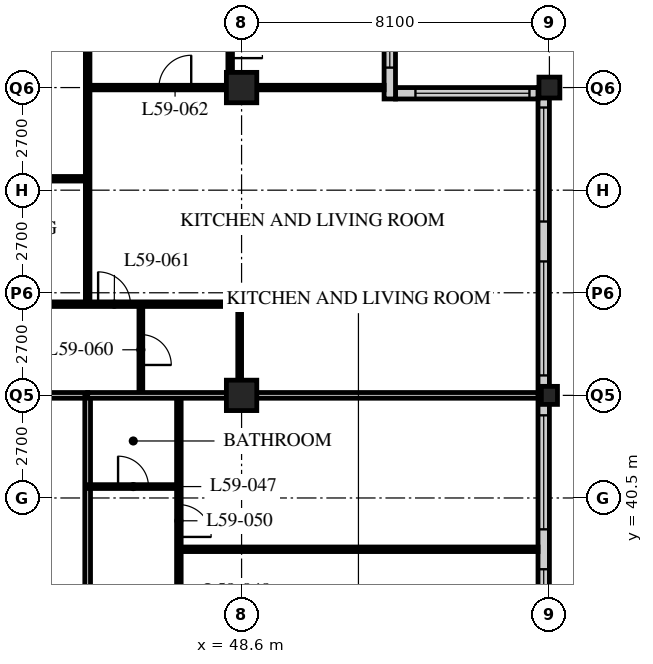
"""IFC4 building model, lengths in metres.
Left out: names, types, materials, properties, quantities, classifications, styles, units other than length and angle.
Written with IfcOpenShell. Run it as: python <this file> out.ifc"""

import sys

from ifc_helpers import new_model, si_unit, direction, frame, frame_2d, origin, origin_2d, place, context, subcontext, project, spatial, rectangle, hollow_rectangle, i_section, extrude, element, fill, save


model = new_model("IFC4")
c1 = context("Model", 3, precision=1e-05, world=origin(), true_north=direction((0.0, 1.0)))
c2 = subcontext(c1, "Body", "Model", "MODEL_VIEW")
j1 = project(units=[si_unit("LENGTHUNIT", "METRE"), si_unit("PLANEANGLEUNIT", "RADIAN")], contexts=[c1])
p1 = place(None, origin())
s1 = spatial("IfcSite", under=j1, at=p1, CompositionType="ELEMENT")
p2 = place(p1, origin())
s2 = spatial("IfcBuilding", under=s1, at=p2, CompositionType="ELEMENT")
p3 = place(p2, frame((0.0, 0.0, 228.0)))
s3 = spatial("IfcBuildingStorey", under=s2, at=p3, CompositionType="ELEMENT", Elevation=228.0)
for number, where, z_axis, x_axis in (
    (1, (48.6, 43.2, 0.0), (0.0, 0.0, 1.0), (1.0, 0.0, 0.0)),
    (2, (48.6, 51.3, 0.0), (0.0, 0.0, 1.0), (1.0, 0.0, 0.0)),
):
    element("IfcColumn", number, at=place(p3, frame(where, z_axis=z_axis, x_axis=x_axis)), inside=s3, PredefinedType="COLUMN", context=c2, shape_type="SweptSolid", body=[
        extrude(hollow_rectangle(XDim=0.8, YDim=0.8, WallThickness=0.08, at=origin_2d()), origin(), (0.0, 0.0, 1.0), 3.6),
    ])
p4 = place(p3, frame((56.7, 43.2, 0.0), z_axis=(0.0, 0.0, 1.0), x_axis=(1.0, 0.0, 0.0)))
e3 = element("IfcColumn", 3, at=p4, inside=s3, PredefinedType="COLUMN", context=c2, shape_type="SweptSolid", body=[
    extrude(i_section(OverallWidth=0.424, OverallDepth=0.475, WebThickness=0.048, FlangeThickness=0.077, FilletRadius=0.015, at=origin_2d()), origin(), (0.0, 0.0, 1.0), 3.6),
])
p5 = place(p3, frame((56.7, 51.3, 0.0), z_axis=(0.0, 0.0, 1.0), x_axis=(1.0, 0.0, 0.0)))
e4 = element("IfcColumn", 4, at=p5, inside=s3, PredefinedType="COLUMN", context=c2, shape_type="SweptSolid", body=[
    extrude(hollow_rectangle(XDim=0.55, YDim=0.55, WallThickness=0.045, at=origin_2d()), origin(), (0.0, 0.0, 1.0), 3.6),
])
p6 = place(p3, frame((56.55, 19.2, 0.0), z_axis=(0.0, 0.0, 1.0), x_axis=(0.0, 1.0, 0.0)))
e5 = element("IfcWall", 5, at=p6, inside=s3, PredefinedType="SOLIDWALL", context=c2, shape_type="SweptSolid", body=[
    extrude(rectangle(XDim=32.1, YDim=0.3, at=frame_2d((16.05, 0.0))), origin(), (0.0, 0.0, 1.0), 3.39),
])
p7 = place(p6, frame((0.225, 0.0, 0.6)))
e6 = element("IfcOpeningElement", 6, at=p7, cuts=e5, PredefinedType="OPENING", context=c2, shape_type="SweptSolid", body=[
    extrude(rectangle(XDim=3.0, YDim=2.0, at=frame_2d((1.5, 1.0))), frame((0.0, 0.16, 0.0), z_axis=(0.0, -1.0, 0.0), x_axis=(1.0, 0.0, 0.0)), (0.0, 0.0, 1.0), 0.32),
])
p8 = place(p6, frame((4.275, 0.0, 0.6)))
e7 = element("IfcOpeningElement", 7, at=p8, cuts=e5, PredefinedType="OPENING", context=c2, shape_type="SweptSolid", body=[
    extrude(rectangle(XDim=3.0, YDim=2.0, at=frame_2d((1.5, 1.0))), frame((0.0, 0.16, 0.0), z_axis=(0.0, -1.0, 0.0), x_axis=(1.0, 0.0, 0.0)), (0.0, 0.0, 1.0), 0.32),
])
p9 = place(p6, frame((8.325, 0.0, 0.6)))
e8 = element("IfcOpeningElement", 8, at=p9, cuts=e5, PredefinedType="OPENING", context=c2, shape_type="SweptSolid", body=[
    extrude(rectangle(XDim=3.0, YDim=2.0, at=frame_2d((1.5, 1.0))), frame((0.0, 0.16, 0.0), z_axis=(0.0, -1.0, 0.0), x_axis=(1.0, 0.0, 0.0)), (0.0, 0.0, 1.0), 0.32),
])
p10 = place(p6, frame((12.375, 0.0, 0.6)))
e9 = element("IfcOpeningElement", 9, at=p10, cuts=e5, PredefinedType="OPENING", context=c2, shape_type="SweptSolid", body=[
    extrude(rectangle(XDim=3.0, YDim=2.0, at=frame_2d((1.5, 1.0))), frame((0.0, 0.16, 0.0), z_axis=(0.0, -1.0, 0.0), x_axis=(1.0, 0.0, 0.0)), (0.0, 0.0, 1.0), 0.32),
])
p11 = place(p6, frame((16.425, 0.0, 0.6)))
e10 = element("IfcOpeningElement", 10, at=p11, cuts=e5, PredefinedType="OPENING", context=c2, shape_type="SweptSolid", body=[
    extrude(rectangle(XDim=3.0, YDim=2.0, at=frame_2d((1.5, 1.0))), frame((0.0, 0.16, 0.0), z_axis=(0.0, -1.0, 0.0), x_axis=(1.0, 0.0, 0.0)), (0.0, 0.0, 1.0), 0.32),
])
p12 = place(p6, frame((20.475, 0.0, 0.6)))
e11 = element("IfcOpeningElement", 11, at=p12, cuts=e5, PredefinedType="OPENING", context=c2, shape_type="SweptSolid", body=[
    extrude(rectangle(XDim=3.0, YDim=2.0, at=frame_2d((1.5, 1.0))), frame((0.0, 0.16, 0.0), z_axis=(0.0, -1.0, 0.0), x_axis=(1.0, 0.0, 0.0)), (0.0, 0.0, 1.0), 0.32),
])
p13 = place(p6, frame((24.525, 0.0, 0.6)))
e12 = element("IfcOpeningElement", 12, at=p13, cuts=e5, PredefinedType="OPENING", context=c2, shape_type="SweptSolid", body=[
    extrude(rectangle(XDim=3.0, YDim=2.0, at=frame_2d((1.5, 1.0))), frame((0.0, 0.16, 0.0), z_axis=(0.0, -1.0, 0.0), x_axis=(1.0, 0.0, 0.0)), (0.0, 0.0, 1.0), 0.32),
])
p14 = place(p6, frame((28.575, 0.0, 0.6)))
e13 = element("IfcOpeningElement", 13, at=p14, cuts=e5, PredefinedType="OPENING", context=c2, shape_type="SweptSolid", body=[
    extrude(rectangle(XDim=3.0, YDim=2.0, at=frame_2d((1.5, 1.0))), frame((0.0, 0.16, 0.0), z_axis=(0.0, -1.0, 0.0), x_axis=(1.0, 0.0, 0.0)), (0.0, 0.0, 1.0), 0.32),
])
p15 = place(p3, frame((56.4, 51.15, 0.0), z_axis=(0.0, 0.0, 1.0), x_axis=(-1.0, 0.0, 0.0)))
e14 = element("IfcWall", 14, at=p15, inside=s3, PredefinedType="SOLIDWALL", context=c2, shape_type="SweptSolid", body=[
    extrude(rectangle(XDim=3.75, YDim=0.3, at=frame_2d((1.875, 0.0))), origin(), (0.0, 0.0, 1.0), 3.39),
])
p16 = place(p15, frame((0.225, 0.0, 0.6)))
e15 = element("IfcOpeningElement", 15, at=p16, cuts=e14, PredefinedType="OPENING", context=c2, shape_type="SweptSolid", body=[
    extrude(rectangle(XDim=3.0, YDim=2.0, at=frame_2d((1.5, 1.0))), frame((0.0, 0.16, 0.0), z_axis=(0.0, -1.0, 0.0), x_axis=(1.0, 0.0, 0.0)), (0.0, 0.0, 1.0), 0.32),
])
p17 = place(p3, frame((52.5, 51.0, 0.0), z_axis=(0.0, 0.0, 1.0), x_axis=(0.0, 1.0, 0.0)))
e16 = element("IfcWall", 16, at=p17, inside=s3, PredefinedType="SOLIDWALL", context=c2, shape_type="SweptSolid", body=[
    extrude(rectangle(XDim=4.35, YDim=0.3, at=frame_2d((2.175, 0.0))), origin(), (0.0, 0.0, 1.0), 3.39),
])
p18 = place(p17, frame((0.825, 0.0, 0.6)))
e17 = element("IfcOpeningElement", 17, at=p18, cuts=e16, PredefinedType="OPENING", context=c2, shape_type="SweptSolid", body=[
    extrude(rectangle(XDim=3.0, YDim=2.0, at=frame_2d((1.5, 1.0))), frame((0.0, 0.16, 0.0), z_axis=(0.0, -1.0, 0.0), x_axis=(1.0, 0.0, 0.0)), (0.0, 0.0, 1.0), 0.32),
])
p19 = place(p3, frame((8.1, 43.2, 0.0), z_axis=(0.0, 0.0, 1.0), x_axis=(1.0, 0.0, 0.0)))
e18 = element("IfcWall", 18, at=p19, inside=s3, PredefinedType="PARTITIONING", context=c2, shape_type="SweptSolid", body=[
    extrude(rectangle(XDim=36.45, YDim=0.15, at=frame_2d((18.225, 0.0))), origin(), (0.0, 0.0, 1.0), 2.628),
])
p20 = place(p19, frame((4.45, 0.0, 0.0)))
e19 = element("IfcOpeningElement", 19, at=p20, cuts=e18, PredefinedType="OPENING", context=c2, shape_type="SweptSolid", body=[
    extrude(rectangle(XDim=1.0, YDim=2.1, at=frame_2d((0.5, 1.05))), frame((0.0, 0.085, 0.0), z_axis=(0.0, -1.0, 0.0), x_axis=(1.0, 0.0, 0.0)), (0.0, 0.0, 1.0), 0.17),
])
p21 = place(p19, frame((17.1, 0.0, 0.0)))
e20 = element("IfcOpeningElement", 20, at=p21, cuts=e18, PredefinedType="OPENING", context=c2, shape_type="SweptSolid", body=[
    extrude(rectangle(XDim=1.0, YDim=2.1, at=frame_2d((0.5, 1.05))), frame((0.0, 0.085, 0.0), z_axis=(0.0, -1.0, 0.0), x_axis=(1.0, 0.0, 0.0)), (0.0, 0.0, 1.0), 0.17),
])
p22 = place(p19, frame((29.05, 0.0, 0.0)))
e21 = element("IfcOpeningElement", 21, at=p22, cuts=e18, PredefinedType="OPENING", context=c2, shape_type="SweptSolid", body=[
    extrude(rectangle(XDim=1.0, YDim=2.1, at=frame_2d((0.5, 1.05))), frame((0.0, 0.085, 0.0), z_axis=(0.0, -1.0, 0.0), x_axis=(1.0, 0.0, 0.0)), (0.0, 0.0, 1.0), 0.17),
])
p23 = place(p19, frame((33.925, 0.0, 0.0)))
e22 = element("IfcOpeningElement", 22, at=p23, cuts=e18, PredefinedType="OPENING", context=c2, shape_type="SweptSolid", body=[
    extrude(rectangle(XDim=1.0, YDim=2.1, at=frame_2d((0.5, 1.05))), frame((0.0, 0.085, 0.0), z_axis=(0.0, -1.0, 0.0), x_axis=(1.0, 0.0, 0.0)), (0.0, 0.0, 1.0), 0.17),
])
p24 = place(p19, frame((1.525, 0.0, 0.0)))
e23 = element("IfcOpeningElement", 23, at=p24, cuts=e18, PredefinedType="OPENING", context=c2, shape_type="SweptSolid", body=[
    extrude(rectangle(XDim=1.0, YDim=2.1, at=frame_2d((0.5, 1.05))), frame((0.0, 0.085, 0.0), z_axis=(0.0, -1.0, 0.0), x_axis=(1.0, 0.0, 0.0)), (0.0, 0.0, 1.0), 0.17),
])
p25 = place(p3, frame((44.55, 18.9, 0.0), z_axis=(0.0, 0.0, 1.0), x_axis=(0.0, 1.0, 0.0)))
e24 = element("IfcWall", 24, at=p25, inside=s3, PredefinedType="PARTITIONING", context=c2, shape_type="SweptSolid", body=[
    extrude(rectangle(XDim=24.3, YDim=0.15, at=frame_2d((12.15, 0.0))), origin(), (0.0, 0.0, 1.0), 3.39),
])
p26 = place(p25, frame((0.4, 0.0, 0.0)))
e25 = element("IfcOpeningElement", 25, at=p26, cuts=e24, PredefinedType="OPENING", context=c2, shape_type="SweptSolid", body=[
    extrude(rectangle(XDim=1.0, YDim=2.1, at=frame_2d((0.5, 1.05))), frame((0.0, 0.085, 0.0), z_axis=(0.0, -1.0, 0.0), x_axis=(1.0, 0.0, 0.0)), (0.0, 0.0, 1.0), 0.17),
])
p27 = place(p25, frame((16.6, 0.0, 0.0)))
e26 = element("IfcOpeningElement", 26, at=p27, cuts=e24, PredefinedType="OPENING", context=c2, shape_type="SweptSolid", body=[
    extrude(rectangle(XDim=1.0, YDim=2.1, at=frame_2d((0.5, 1.05))), frame((0.0, 0.085, 0.0), z_axis=(0.0, -1.0, 0.0), x_axis=(1.0, 0.0, 0.0)), (0.0, 0.0, 1.0), 0.17),
])
p28 = place(p3, frame((46.95, 18.9, 0.0), z_axis=(0.0, 0.0, 1.0), x_axis=(0.0, 1.0, 0.0)))
e27 = element("IfcWall", 27, at=p28, inside=s3, PredefinedType="PARTITIONING", context=c2, shape_type="SweptSolid", body=[
    extrude(rectangle(XDim=24.3, YDim=0.12, at=frame_2d((12.15, 0.0))), origin(), (0.0, 0.0, 1.0), 3.39),
])
p29 = place(p28, frame((0.975, 0.0, 0.0)))
e28 = element("IfcOpeningElement", 28, at=p29, cuts=e27, PredefinedType="OPENING", context=c2, shape_type="SweptSolid", body=[
    extrude(rectangle(XDim=0.85, YDim=2.1, at=frame_2d((0.425, 1.05))), frame((0.0, 0.07, 0.0), z_axis=(0.0, -1.0, 0.0), x_axis=(1.0, 0.0, 0.0)), (0.0, 0.0, 1.0), 0.14),
])
p30 = place(p28, frame((8.425, 0.0, 0.0)))
e29 = element("IfcOpeningElement", 29, at=p30, cuts=e27, PredefinedType="OPENING", context=c2, shape_type="SweptSolid", body=[
    extrude(rectangle(XDim=0.85, YDim=2.1, at=frame_2d((0.425, 1.05))), frame((0.0, 0.07, 0.0), z_axis=(0.0, -1.0, 0.0), x_axis=(1.0, 0.0, 0.0)), (0.0, 0.0, 1.0), 0.14),
])
p31 = place(p28, frame((12.475, 0.0, 0.0)))
e30 = element("IfcOpeningElement", 30, at=p31, cuts=e27, PredefinedType="OPENING", context=c2, shape_type="SweptSolid", body=[
    extrude(rectangle(XDim=0.85, YDim=2.1, at=frame_2d((0.425, 1.05))), frame((0.0, 0.07, 0.0), z_axis=(0.0, -1.0, 0.0), x_axis=(1.0, 0.0, 0.0)), (0.0, 0.0, 1.0), 0.14),
])
p32 = place(p28, frame((17.175, 0.0, 0.0)))
e31 = element("IfcOpeningElement", 31, at=p32, cuts=e27, PredefinedType="OPENING", context=c2, shape_type="SweptSolid", body=[
    extrude(rectangle(XDim=0.85, YDim=2.1, at=frame_2d((0.425, 1.05))), frame((0.0, 0.07, 0.0), z_axis=(0.0, -1.0, 0.0), x_axis=(1.0, 0.0, 0.0)), (0.0, 0.0, 1.0), 0.14),
])
p33 = place(p28, frame((20.575, 0.0, 0.0)))
e32 = element("IfcOpeningElement", 32, at=p33, cuts=e27, PredefinedType="OPENING", context=c2, shape_type="SweptSolid", body=[
    extrude(rectangle(XDim=0.85, YDim=2.1, at=frame_2d((0.425, 1.05))), frame((0.0, 0.07, 0.0), z_axis=(0.0, -1.0, 0.0), x_axis=(1.0, 0.0, 0.0)), (0.0, 0.0, 1.0), 0.14),
])
p34 = place(p3, frame((44.55, 40.8, 0.0), z_axis=(0.0, 0.0, 1.0), x_axis=(1.0, 0.0, 0.0)))
e33 = element("IfcWall", 33, at=p34, inside=s3, PredefinedType="PARTITIONING", context=c2, shape_type="SweptSolid", body=[
    extrude(rectangle(XDim=2.4, YDim=0.1, at=frame_2d((1.2, 0.0))), origin(), (0.0, 0.0, 1.0), 3.39),
])
p35 = place(p34, frame((0.8, 0.0, 0.0)))
e34 = element("IfcOpeningElement", 34, at=p35, cuts=e33, PredefinedType="OPENING", context=c2, shape_type="SweptSolid", body=[
    extrude(rectangle(XDim=0.8, YDim=2.1, at=frame_2d((0.4, 1.05))), frame((0.0, 0.06, 0.0), z_axis=(0.0, -1.0, 0.0), x_axis=(1.0, 0.0, 0.0)), (0.0, 0.0, 1.0), 0.12),
])
p36 = place(p3, frame((46.95, 39.15, 0.0), z_axis=(0.0, 0.0, 1.0), x_axis=(1.0, 0.0, 0.0)))
e35 = element("IfcWall", 35, at=p36, inside=s3, PredefinedType="PARTITIONING", context=c2, shape_type="SweptSolid", body=[
    extrude(rectangle(XDim=9.45, YDim=0.12, at=frame_2d((4.725, 0.0))), origin(), (0.0, 0.0, 1.0), 3.39),
])
p37 = place(p3, frame((40.5, 45.6, 0.0), z_axis=(0.0, 0.0, 1.0), x_axis=(1.0, 0.0, 0.0)))
e36 = element("IfcWall", 36, at=p37, inside=s3, PredefinedType="PARTITIONING", context=c2, shape_type="SweptSolid", body=[
    extrude(rectangle(XDim=8.05, YDim=0.12, at=frame_2d((4.025, 0.0))), origin(), (0.0, 0.0, 1.0), 3.39),
])
p38 = place(p37, frame((0.475, 0.0, 0.0)))
e37 = element("IfcOpeningElement", 37, at=p38, cuts=e36, PredefinedType="OPENING", context=c2, shape_type="SweptSolid", body=[
    extrude(rectangle(XDim=0.85, YDim=2.1, at=frame_2d((0.425, 1.05))), frame((0.0, 0.07, 0.0), z_axis=(0.0, -1.0, 0.0), x_axis=(1.0, 0.0, 0.0)), (0.0, 0.0, 1.0), 0.14),
])
p39 = place(p37, frame((4.325, 0.0, 0.0)))
e38 = element("IfcOpeningElement", 38, at=p39, cuts=e36, PredefinedType="OPENING", context=c2, shape_type="SweptSolid", body=[
    extrude(rectangle(XDim=0.85, YDim=2.1, at=frame_2d((0.425, 1.05))), frame((0.0, 0.07, 0.0), z_axis=(0.0, -1.0, 0.0), x_axis=(1.0, 0.0, 0.0)), (0.0, 0.0, 1.0), 0.14),
])
p40 = place(p3, frame((45.95, 43.2, 0.0), z_axis=(0.0, 0.0, 1.0), x_axis=(0.0, 1.0, 0.0)))
e39 = element("IfcWall", 39, at=p40, inside=s3, PredefinedType="PARTITIONING", context=c2, shape_type="SweptSolid", body=[
    extrude(rectangle(XDim=2.4, YDim=0.1, at=frame_2d((1.2, 0.0))), origin(), (0.0, 0.0, 1.0), 3.39),
])
p41 = place(p40, frame((0.8, 0.0, 0.0)))
e40 = element("IfcOpeningElement", 40, at=p41, cuts=e39, PredefinedType="OPENING", context=c2, shape_type="SweptSolid", body=[
    extrude(rectangle(XDim=0.8, YDim=2.1, at=frame_2d((0.4, 1.05))), frame((0.0, 0.06, 0.0), z_axis=(0.0, -1.0, 0.0), x_axis=(1.0, 0.0, 0.0)), (0.0, 0.0, 1.0), 0.12),
])
p42 = place(p3, frame((48.55, 43.2, 0.0), z_axis=(0.0, 0.0, 1.0), x_axis=(0.0, 1.0, 0.0)))
e41 = element("IfcWall", 41, at=p42, inside=s3, PredefinedType="PARTITIONING", context=c2, shape_type="SweptSolid", body=[
    extrude(rectangle(XDim=2.4, YDim=0.1, at=frame_2d((1.2, 0.0))), origin(), (0.0, 0.0, 1.0), 2.628),
])
p43 = place(p3, frame((44.55, 45.6, 0.0), z_axis=(0.0, 0.0, 1.0), x_axis=(0.0, 1.0, 0.0)))
e42 = element("IfcWall", 42, at=p43, inside=s3, PredefinedType="PARTITIONING", context=c2, shape_type="SweptSolid", body=[
    extrude(rectangle(XDim=13.5, YDim=0.12, at=frame_2d((6.75, 0.0))), origin(), (0.0, 0.0, 1.0), 3.39),
])
p44 = place(p3, frame((44.55, 51.3, 0.0), z_axis=(0.0, 0.0, 1.0), x_axis=(1.0, 0.0, 0.0)))
e43 = element("IfcWall", 43, at=p44, inside=s3, PredefinedType="PARTITIONING", context=c2, shape_type="SweptSolid", body=[
    extrude(rectangle(XDim=7.8, YDim=0.12, at=frame_2d((3.9, 0.0))), origin(), (0.0, 0.0, 1.0), 2.628),
])
p45 = place(p44, frame((1.875, 0.0, 0.0)))
e44 = element("IfcOpeningElement", 44, at=p45, cuts=e43, PredefinedType="OPENING", context=c2, shape_type="SweptSolid", body=[
    extrude(rectangle(XDim=0.85, YDim=2.1, at=frame_2d((0.425, 1.05))), frame((0.0, 0.07, 0.0), z_axis=(0.0, -1.0, 0.0), x_axis=(1.0, 0.0, 0.0)), (0.0, 0.0, 1.0), 0.14),
])
p46 = place(p3, frame((44.55, 43.2, 0.0), z_axis=(0.0, 0.0, 1.0), x_axis=(1.0, 0.0, 0.0)))
e45 = element("IfcWall", 45, at=p46, inside=s3, PredefinedType="PARTITIONING", context=c2, shape_type="SweptSolid", body=[
    extrude(rectangle(XDim=11.85, YDim=0.15, at=frame_2d((5.925, 0.0))), origin(), (0.0, 0.0, 1.0), 2.628),
])
p47 = place(p3, frame((48.3, 51.3, 0.0), z_axis=(0.0, 0.0, 1.0), x_axis=(0.0, 1.0, 0.0)))
e46 = element("IfcWall", 46, at=p47, inside=s3, PredefinedType="PARTITIONING", context=c2, shape_type="SweptSolid", body=[
    extrude(rectangle(XDim=3.75, YDim=0.12, at=frame_2d((1.875, 0.0))), origin(), (0.0, 0.0, 1.0), 3.39),
])
p48 = place(p47, frame((0.775, 0.0, 0.0)))
e47 = element("IfcOpeningElement", 47, at=p48, cuts=e46, PredefinedType="OPENING", context=c2, shape_type="SweptSolid", body=[
    extrude(rectangle(XDim=0.85, YDim=2.1, at=frame_2d((0.425, 1.05))), frame((0.0, 0.07, 0.0), z_axis=(0.0, -1.0, 0.0), x_axis=(1.0, 0.0, 0.0)), (0.0, 0.0, 1.0), 0.14),
])
p49 = place(p3, frame((40.5, 48.9, 0.0), z_axis=(0.0, 0.0, 1.0), x_axis=(1.0, 0.0, 0.0)))
e48 = element("IfcWall", 48, at=p49, inside=s3, PredefinedType="PARTITIONING", context=c2, shape_type="SweptSolid", body=[
    extrude(rectangle(XDim=4.05, YDim=0.12, at=frame_2d((2.025, 0.0))), origin(), (0.0, 0.0, 1.0), 3.39),
])
p50 = place(p49, frame((1.6, 0.0, 0.0)))
e49 = element("IfcOpeningElement", 49, at=p50, cuts=e48, PredefinedType="OPENING", context=c2, shape_type="SweptSolid", body=[
    extrude(rectangle(XDim=0.85, YDim=2.1, at=frame_2d((0.425, 1.05))), frame((0.0, 0.07, 0.0), z_axis=(0.0, -1.0, 0.0), x_axis=(1.0, 0.0, 0.0)), (0.0, 0.0, 1.0), 0.14),
])
p51 = place(p11, origin())
e50 = element("IfcWindow", 50, at=p51, inside=s3, PartitioningType="SINGLE_PANEL", PredefinedType="WINDOW", context=c2, shape_type="SweptSolid", body=[
    extrude(rectangle(XDim=3.0, YDim=2.0, at=frame_2d((1.5, 1.0))), frame((0.0, 0.03, 0.0), z_axis=(0.0, -1.0, 0.0), x_axis=(1.0, 0.0, 0.0)), (0.0, 0.0, 1.0), 0.06),
])
fill(e10, e50)
p52 = place(p12, origin())
e51 = element("IfcWindow", 51, at=p52, inside=s3, PartitioningType="SINGLE_PANEL", PredefinedType="WINDOW", context=c2, shape_type="SweptSolid", body=[
    extrude(rectangle(XDim=3.0, YDim=2.0, at=frame_2d((1.5, 1.0))), frame((0.0, 0.03, 0.0), z_axis=(0.0, -1.0, 0.0), x_axis=(1.0, 0.0, 0.0)), (0.0, 0.0, 1.0), 0.06),
])
fill(e11, e51)
p53 = place(p13, origin())
e52 = element("IfcWindow", 52, at=p53, inside=s3, PartitioningType="SINGLE_PANEL", PredefinedType="WINDOW", context=c2, shape_type="SweptSolid", body=[
    extrude(rectangle(XDim=3.0, YDim=2.0, at=frame_2d((1.5, 1.0))), frame((0.0, 0.03, 0.0), z_axis=(0.0, -1.0, 0.0), x_axis=(1.0, 0.0, 0.0)), (0.0, 0.0, 1.0), 0.06),
])
fill(e12, e52)
p54 = place(p14, origin())
e53 = element("IfcWindow", 53, at=p54, inside=s3, PartitioningType="SINGLE_PANEL", PredefinedType="WINDOW", context=c2, shape_type="SweptSolid", body=[
    extrude(rectangle(XDim=3.0, YDim=2.0, at=frame_2d((1.5, 1.0))), frame((0.0, 0.03, 0.0), z_axis=(0.0, -1.0, 0.0), x_axis=(1.0, 0.0, 0.0)), (0.0, 0.0, 1.0), 0.06),
])
fill(e13, e53)
p55 = place(p16, origin())
e54 = element("IfcWindow", 54, at=p55, inside=s3, PartitioningType="SINGLE_PANEL", PredefinedType="WINDOW", context=c2, shape_type="SweptSolid", body=[
    extrude(rectangle(XDim=3.0, YDim=2.0, at=frame_2d((1.5, 1.0))), frame((0.0, 0.03, 0.0), z_axis=(0.0, -1.0, 0.0), x_axis=(1.0, 0.0, 0.0)), (0.0, 0.0, 1.0), 0.06),
])
fill(e15, e54)
p56 = place(p18, origin())
e55 = element("IfcWindow", 55, at=p56, inside=s3, PartitioningType="SINGLE_PANEL", PredefinedType="WINDOW", context=c2, shape_type="SweptSolid", body=[
    extrude(rectangle(XDim=3.0, YDim=2.0, at=frame_2d((1.5, 1.0))), frame((0.0, 0.03, 0.0), z_axis=(0.0, -1.0, 0.0), x_axis=(1.0, 0.0, 0.0)), (0.0, 0.0, 1.0), 0.06),
])
fill(e17, e55)
p57 = place(p35, origin())
e56 = element("IfcDoor", 56, at=p57, inside=s3, OperationType="SINGLE_SWING_LEFT", PredefinedType="DOOR", context=c2, shape_type="SweptSolid", body=[
    extrude(rectangle(XDim=0.8, YDim=2.1, at=frame_2d((0.4, 1.05))), frame((0.0, 0.025, 0.0), z_axis=(0.0, -1.0, 0.0), x_axis=(1.0, 0.0, 0.0)), (0.0, 0.0, 1.0), 0.05),
])
fill(e34, e56)
p58 = place(p33, origin())
e57 = element("IfcDoor", 57, at=p58, inside=s3, OperationType="SINGLE_SWING_RIGHT", PredefinedType="DOOR", context=c2, shape_type="SweptSolid", body=[
    extrude(rectangle(XDim=0.85, YDim=2.1, at=frame_2d((0.425, 1.05))), frame((0.0, 0.025, 0.0), z_axis=(0.0, -1.0, 0.0), x_axis=(1.0, 0.0, 0.0)), (0.0, 0.0, 1.0), 0.05),
])
fill(e32, e57)
p59 = place(p41, origin())
e58 = element("IfcDoor", 58, at=p59, inside=s3, OperationType="SINGLE_SWING_RIGHT", PredefinedType="DOOR", context=c2, shape_type="SweptSolid", body=[
    extrude(rectangle(XDim=0.8, YDim=2.1, at=frame_2d((0.4, 1.05))), frame((0.0, 0.025, 0.0), z_axis=(0.0, -1.0, 0.0), x_axis=(1.0, 0.0, 0.0)), (0.0, 0.0, 1.0), 0.05),
])
fill(e40, e58)
p60 = place(p39, origin())
e59 = element("IfcDoor", 59, at=p60, inside=s3, OperationType="SINGLE_SWING_LEFT", PredefinedType="DOOR", context=c2, shape_type="SweptSolid", body=[
    extrude(rectangle(XDim=0.85, YDim=2.1, at=frame_2d((0.425, 1.05))), frame((0.0, 0.025, 0.0), z_axis=(0.0, -1.0, 0.0), x_axis=(1.0, 0.0, 0.0)), (0.0, 0.0, 1.0), 0.05),
])
fill(e38, e59)
p61 = place(p45, origin())
e60 = element("IfcDoor", 60, at=p61, inside=s3, OperationType="SINGLE_SWING_RIGHT", PredefinedType="DOOR", context=c2, shape_type="SweptSolid", body=[
    extrude(rectangle(XDim=0.85, YDim=2.1, at=frame_2d((0.425, 1.05))), frame((0.0, 0.025, 0.0), z_axis=(0.0, -1.0, 0.0), x_axis=(1.0, 0.0, 0.0)), (0.0, 0.0, 1.0), 0.05),
])
fill(e44, e60)
p62 = place(p48, origin())
e61 = element("IfcDoor", 61, at=p62, inside=s3, OperationType="SINGLE_SWING_RIGHT", PredefinedType="DOOR", context=c2, shape_type="SweptSolid", body=[
    extrude(rectangle(XDim=0.85, YDim=2.1, at=frame_2d((0.425, 1.05))), frame((0.0, 0.025, 0.0), z_axis=(0.0, -1.0, 0.0), x_axis=(1.0, 0.0, 0.0)), (0.0, 0.0, 1.0), 0.05),
])
fill(e47, e61)
save(model, sys.argv[1])
